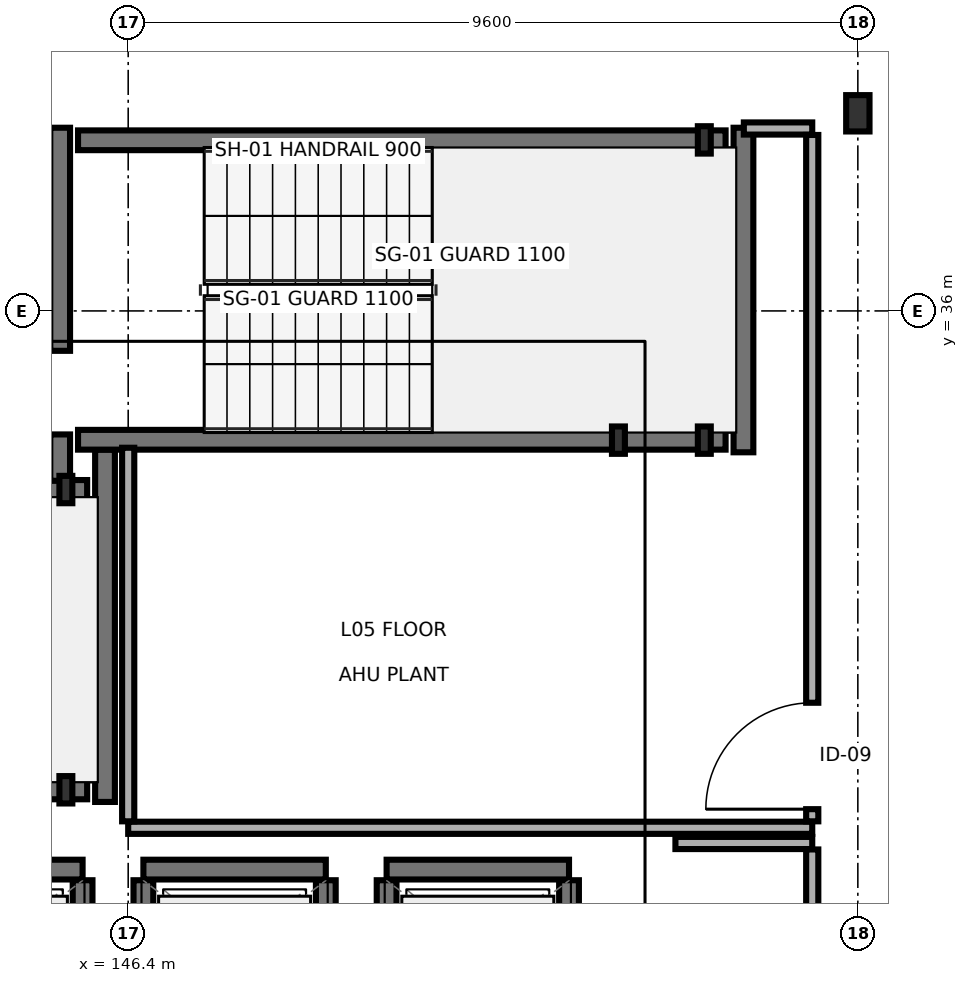
"""IFC4 building model, lengths in metres.
Left out: names, types, materials, properties, quantities, classifications, styles, units other than length and angle.
Written with IfcOpenShell. Run it as: python <this file> out.ifc"""

import sys

from ifc_helpers import new_model, si_unit, direction, frame, frame_2d, origin, origin_2d, place, context, subcontext, project, spatial, rectangle, i_section, extrude, element, fill, save


model = new_model("IFC4")
c1 = context("Model", 3, precision=1e-05, world=origin(), true_north=direction((0.0, 1.0)))
c2 = subcontext(c1, "Body", "Model", "MODEL_VIEW")
j1 = project(units=[si_unit("LENGTHUNIT", "METRE"), si_unit("PLANEANGLEUNIT", "RADIAN")], contexts=[c1])
p1 = place(None, origin())
s1 = spatial("IfcSite", under=j1, at=p1, CompositionType="ELEMENT")
p2 = place(p1, origin())
s2 = spatial("IfcBuilding", under=s1, at=p2, CompositionType="ELEMENT")
p3 = place(p2, frame((0.0, 0.0, 18.1)))
s3 = spatial("IfcBuildingStorey", under=s2, at=p3, CompositionType="ELEMENT", Elevation=18.1)
for number, where, z_axis, x_axis in (
    (1, (145.58, 29.7, 0.0), (0.0, 0.0, 1.0), (1.0, 0.0, 0.0)),
    (2, (145.58, 33.65, 0.0), (0.0, 0.0, 1.0), (1.0, 0.0, 0.0)),
    (3, (152.85, 34.3, 0.0), (0.0, 0.0, 1.0), (1.0, 0.0, 0.0)),
    (4, (153.98, 34.3, 0.0), (0.0, 0.0, 1.0), (1.0, 0.0, 0.0)),
    (5, (153.98, 38.25, 0.0), (0.0, 0.0, 1.0), (1.0, 0.0, 0.0)),
):
    element("IfcColumn", number, at=place(p3, frame(where, z_axis=z_axis, x_axis=x_axis)), inside=s3, PredefinedType="PILASTER", context=c2, shape_type="SweptSolid", body=[
        extrude(i_section(OverallWidth=0.17, OverallDepth=0.36, WebThickness=0.008, FlangeThickness=0.013, FilletRadius=0.018, at=origin_2d()), origin(), (0.0, 0.0, 1.0), 3.4),
    ])
p4 = place(p3, frame((156.0, 38.6, 0.0), z_axis=(0.0, 0.0, 1.0), x_axis=(1.0, 0.0, 0.0)))
e6 = element("IfcColumn", 6, at=p4, inside=s3, PredefinedType="COLUMN", context=c2, shape_type="SweptSolid", body=[
    extrude(i_section(OverallWidth=0.307, OverallDepth=0.478, WebThickness=0.021, FlangeThickness=0.04, FilletRadius=0.027, at=origin_2d()), origin(), (0.0, 0.0, 1.0), 3.4),
])
p5 = place(p3, frame((146.095, 29.54, 0.0), z_axis=(0.0, 0.0, 1.0), x_axis=(0.0, 1.0, 0.0)))
e7 = element("IfcWall", 7, at=p5, inside=s3, PredefinedType="SHEAR", context=c2, shape_type="SweptSolid", body=[
    extrude(rectangle(XDim=4.635, YDim=0.26, at=frame_2d((2.317, 0.0))), origin(), (0.0, 0.0, 1.0), 3.21),
])
for number, where, z_axis, x_axis in (
    (8, (137.34, 29.705, 0.0), (0.0, 0.0, 1.0), (1.0, 0.0, 0.0)),
    (9, (137.34, 33.645, 0.0), (0.0, 0.0, 1.0), (1.0, 0.0, 0.0)),
):
    element("IfcWall", number, at=place(p3, frame(where, z_axis=z_axis, x_axis=x_axis)), inside=s3, PredefinedType="SHEAR", context=c2, shape_type="SweptSolid", body=[
        extrude(rectangle(XDim=8.52, YDim=0.26, at=frame_2d((4.26, 0.0))), origin(), (0.0, 0.0, 1.0), 3.21),
    ])
p6 = place(p3, frame((145.505, 33.765, 0.0), z_axis=(0.0, 0.0, 1.0), x_axis=(0.0, 1.0, 0.0)))
e10 = element("IfcWall", 10, at=p6, inside=s3, PredefinedType="SHEAR", context=c2, shape_type="SweptSolid", body=[
    extrude(rectangle(XDim=4.645, YDim=0.26, at=frame_2d((2.323, 0.0))), origin(), (0.0, 0.0, 1.0), 3.21),
])
p7 = place(p6, frame((0.61, 0.0, 0.0)))
e11 = element("IfcOpeningElement", 11, at=p7, cuts=e10, PredefinedType="OPENING", context=c2, shape_type="SweptSolid", body=[
    extrude(rectangle(XDim=1.1, YDim=2.2, at=frame_2d((0.55, 1.1))), frame((0.0, 0.14, 0.0), z_axis=(0.0, -1.0, 0.0), x_axis=(1.0, 0.0, 0.0)), (0.0, 0.0, 1.0), 0.28),
])
p8 = place(p3, frame((154.495, 34.14, 0.0), z_axis=(0.0, 0.0, 1.0), x_axis=(0.0, 1.0, 0.0)))
e12 = element("IfcWall", 12, at=p8, inside=s3, PredefinedType="SHEAR", context=c2, shape_type="SweptSolid", body=[
    extrude(rectangle(XDim=4.27, YDim=0.26, at=frame_2d((2.135, 0.0))), origin(), (0.0, 0.0, 1.0), 3.21),
])
for number, where, z_axis, x_axis in (
    (13, (145.74, 34.305, 0.0), (0.0, 0.0, 1.0), (1.0, 0.0, 0.0)),
    (14, (145.74, 38.245, 0.0), (0.0, 0.0, 1.0), (1.0, 0.0, 0.0)),
):
    element("IfcWall", number, at=place(p3, frame(where, z_axis=z_axis, x_axis=x_axis)), inside=s3, PredefinedType="SHEAR", context=c2, shape_type="SweptSolid", body=[
        extrude(rectangle(XDim=8.52, YDim=0.26, at=frame_2d((4.26, 0.0))), origin(), (0.0, 0.0, 1.0), 3.21),
    ])
p9 = place(p3, frame((143.4, 28.65, 0.0), z_axis=(0.0, 0.0, 1.0), x_axis=(1.0, 0.0, 0.0)))
e15 = element("IfcWall", 15, at=p9, inside=s3, PredefinedType="SHEAR", context=c2, shape_type="SweptSolid", body=[
    extrude(rectangle(XDim=2.4, YDim=0.26, at=frame_2d((1.2, 0.0))), origin(), (0.0, 0.0, 1.0), 3.21),
])
p10 = place(p3, frame((145.8, 26.69, 0.0), z_axis=(0.0, 0.0, 1.0), x_axis=(0.0, 1.0, 0.0)))
e16 = element("IfcWall", 16, at=p10, inside=s3, PredefinedType="SHEAR", context=c2, shape_type="SweptSolid", body=[
    extrude(rectangle(XDim=1.82, YDim=0.26, at=frame_2d((0.91, 0.0))), origin(), (0.0, 0.0, 1.0), 3.21),
])
p11 = place(p3, frame((146.6, 28.65, 0.0), z_axis=(0.0, 0.0, 1.0), x_axis=(1.0, 0.0, 0.0)))
e17 = element("IfcWall", 17, at=p11, inside=s3, PredefinedType="SHEAR", context=c2, shape_type="SweptSolid", body=[
    extrude(rectangle(XDim=2.4, YDim=0.26, at=frame_2d((1.2, 0.0))), origin(), (0.0, 0.0, 1.0), 3.21),
])
for number, where, z_axis, x_axis in (
    (18, (146.6, 26.69, 0.0), (0.0, 0.0, 1.0), (0.0, 1.0, 0.0)),
    (19, (149.0, 26.69, 0.0), (0.0, 0.0, 1.0), (0.0, 1.0, 0.0)),
):
    element("IfcWall", number, at=place(p3, frame(where, z_axis=z_axis, x_axis=x_axis)), inside=s3, PredefinedType="SHEAR", context=c2, shape_type="SweptSolid", body=[
        extrude(rectangle(XDim=1.82, YDim=0.26, at=frame_2d((0.91, 0.0))), origin(), (0.0, 0.0, 1.0), 3.21),
    ])
p12 = place(p3, frame((149.8, 28.65, 0.0), z_axis=(0.0, 0.0, 1.0), x_axis=(1.0, 0.0, 0.0)))
e20 = element("IfcWall", 20, at=p12, inside=s3, PredefinedType="SHEAR", context=c2, shape_type="SweptSolid", body=[
    extrude(rectangle(XDim=2.4, YDim=0.26, at=frame_2d((1.2, 0.0))), origin(), (0.0, 0.0, 1.0), 3.21),
])
for number, where, z_axis, x_axis in (
    (21, (149.8, 26.69, 0.0), (0.0, 0.0, 1.0), (0.0, 1.0, 0.0)),
    (22, (152.2, 26.69, 0.0), (0.0, 0.0, 1.0), (0.0, 1.0, 0.0)),
):
    element("IfcWall", number, at=place(p3, frame(where, z_axis=z_axis, x_axis=x_axis)), inside=s3, PredefinedType="SHEAR", context=c2, shape_type="SweptSolid", body=[
        extrude(rectangle(XDim=1.82, YDim=0.26, at=frame_2d((0.91, 0.0))), origin(), (0.0, 0.0, 1.0), 3.21),
    ])
p13 = place(p3, frame((146.4, 29.2, 0.0), z_axis=(0.0, 0.0, 1.0), x_axis=(1.0, 0.0, 0.0)))
e23 = element("IfcWall", 23, at=p13, inside=s3, PredefinedType="PARTITIONING", context=c2, shape_type="SweptSolid", body=[
    extrude(rectangle(XDim=9.0, YDim=0.16, at=frame_2d((4.5, 0.0))), origin(), (0.0, 0.0, 1.0), 3.21),
])
p14 = place(p3, frame((146.4, 29.285, 0.0), z_axis=(0.0, 0.0, 1.0), x_axis=(0.0, 1.0, 0.0)))
e24 = element("IfcWall", 24, at=p14, inside=s3, PredefinedType="PARTITIONING", context=c2, shape_type="SweptSolid", body=[
    extrude(rectangle(XDim=4.915, YDim=0.16, at=frame_2d((2.458, 0.0))), origin(), (0.0, 0.0, 1.0), 3.21),
])
p15 = place(p3, frame((154.5, 38.4, 0.0), z_axis=(0.0, 0.0, 1.0), x_axis=(1.0, 0.0, 0.0)))
e25 = element("IfcWall", 25, at=p15, inside=s3, PredefinedType="PARTITIONING", context=c2, shape_type="SweptSolid", body=[
    extrude(rectangle(XDim=0.9, YDim=0.16, at=frame_2d((0.45, 0.0))), origin(), (0.0, 0.0, 1.0), 2.745),
])
p16 = place(p3, frame((155.4, 29.285, 0.0), z_axis=(0.0, 0.0, 1.0), x_axis=(0.0, 1.0, 0.0)))
e26 = element("IfcWall", 26, at=p16, inside=s3, PredefinedType="PARTITIONING", context=c2, shape_type="SweptSolid", body=[
    extrude(rectangle(XDim=9.03, YDim=0.16, at=frame_2d((4.515, 0.0))), origin(), (0.0, 0.0, 1.0), 3.21),
])
p17 = place(p16, frame((0.16, 0.0, 0.0)))
e27 = element("IfcOpeningElement", 27, at=p17, cuts=e26, PredefinedType="OPENING", context=c2, shape_type="SweptSolid", body=[
    extrude(rectangle(XDim=1.4, YDim=2.2, at=frame_2d((0.7, 1.1))), frame((0.0, 0.09, 0.0), z_axis=(0.0, -1.0, 0.0), x_axis=(1.0, 0.0, 0.0)), (0.0, 0.0, 1.0), 0.18),
])
p18 = place(p3, frame((153.6, 29.0, 0.0), z_axis=(0.0, 0.0, 1.0), x_axis=(1.0, 0.0, 0.0)))
e28 = element("IfcWall", 28, at=p18, inside=s3, PredefinedType="PARTITIONING", context=c2, shape_type="SweptSolid", body=[
    extrude(rectangle(XDim=1.8, YDim=0.16, at=frame_2d((0.9, 0.0))), origin(), (0.0, 0.0, 1.0), 3.21),
])
p19 = place(p3, frame((155.4, 16.885, 0.0), z_axis=(0.0, 0.0, 1.0), x_axis=(0.0, 1.0, 0.0)))
e29 = element("IfcWall", 29, at=p19, inside=s3, PredefinedType="PARTITIONING", context=c2, shape_type="SweptSolid", body=[
    extrude(rectangle(XDim=12.03, YDim=0.16, at=frame_2d((6.015, 0.0))), origin(), (0.0, 0.0, 1.0), 2.745),
])
p20 = place(p19, frame((5.365, 0.0, 0.0)))
e30 = element("IfcOpeningElement", 30, at=p20, cuts=e29, PredefinedType="OPENING", context=c2, shape_type="SweptSolid", body=[
    extrude(rectangle(XDim=1.3, YDim=2.2, at=frame_2d((0.65, 1.1))), frame((0.0, 0.09, 0.0), z_axis=(0.0, -1.0, 0.0), x_axis=(1.0, 0.0, 0.0)), (0.0, 0.0, 1.0), 0.18),
])
p21 = place(p7, origin())
e31 = element("IfcDoor", 31, at=p21, inside=s3, OperationType="SINGLE_SWING_RIGHT", PredefinedType="DOOR", context=c2, shape_type="SweptSolid", body=[
    extrude(rectangle(XDim=1.1, YDim=2.2, at=frame_2d((0.55, 1.1))), frame((0.0, 0.025, 0.0), z_axis=(0.0, -1.0, 0.0), x_axis=(1.0, 0.0, 0.0)), (0.0, 0.0, 1.0), 0.05),
])
fill(e11, e31)
p22 = place(p17, origin())
e32 = element("IfcDoor", 32, at=p22, inside=s3, OperationType="SINGLE_SWING_LEFT", PredefinedType="DOOR", context=c2, shape_type="SweptSolid", body=[
    extrude(rectangle(XDim=1.4, YDim=2.2, at=frame_2d((0.7, 1.1))), frame((0.0, 0.025, 0.0), z_axis=(0.0, -1.0, 0.0), x_axis=(1.0, 0.0, 0.0)), (0.0, 0.0, 1.0), 0.05),
])
fill(e27, e32)
save(model, sys.argv[1])
